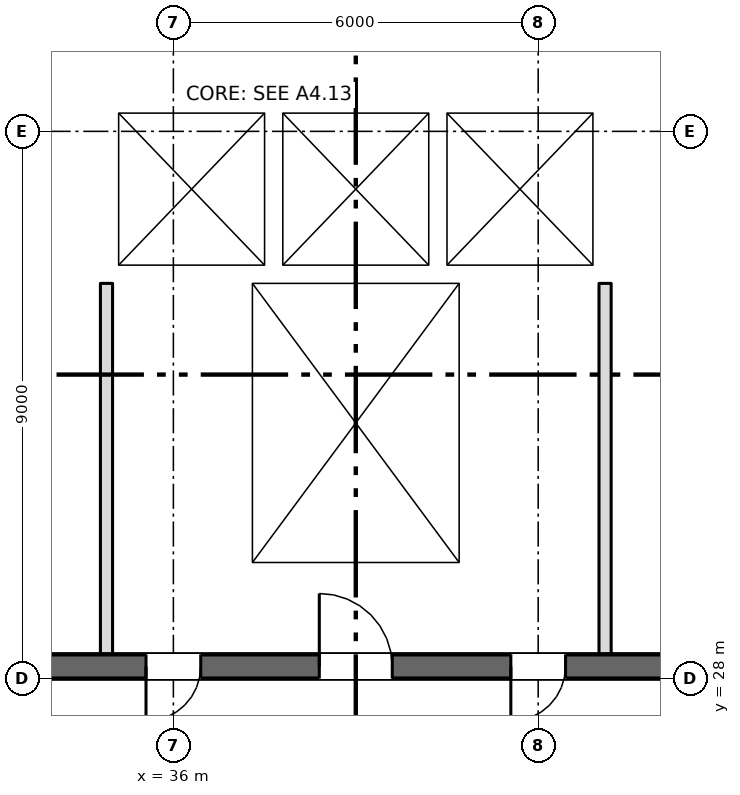
"""IFC4 building model, lengths in metres.
Left out: names, types, materials, properties, quantities, classifications, styles, units other than length and angle.
Written with IfcOpenShell. Run it as: python <this file> out.ifc"""

import sys

from ifc_helpers import new_model, si_unit, direction, frame, frame_2d, origin, place, context, subcontext, project, spatial, rectangle, extrude, element, fill, save


model = new_model("IFC4")
c1 = context("Model", 3, precision=1e-05, world=origin(), true_north=direction((0.0, 1.0)))
c2 = subcontext(c1, "Body", "Model", "MODEL_VIEW")
j1 = project(units=[si_unit("LENGTHUNIT", "METRE"), si_unit("PLANEANGLEUNIT", "RADIAN")], contexts=[c1])
p1 = place(None, origin())
s1 = spatial("IfcSite", under=j1, at=p1, CompositionType="ELEMENT")
p2 = place(p1, origin())
s2 = spatial("IfcBuilding", under=s1, at=p2, CompositionType="ELEMENT")
p3 = place(p2, frame((0.0, 0.0, 86.25)))
s3 = spatial("IfcBuildingStorey", under=s2, at=p3, CompositionType="ELEMENT", Elevation=86.25)
p4 = place(p3, frame((6.7, 28.2, 0.0), z_axis=(0.0, 0.0, 1.0), x_axis=(1.0, 0.0, 0.0)))
e1 = element("IfcWall", 1, at=p4, inside=s3, PredefinedType="SHEAR", context=c2, shape_type="SweptSolid", body=[
    extrude(rectangle(XDim=57.8, YDim=0.4, at=frame_2d((28.9, 0.0))), origin(), (0.0, 0.0, 1.0), 3.15),
])
p5 = place(p4, frame((12.812, 0.0, 0.0)))
e2 = element("IfcOpeningElement", 2, at=p5, cuts=e1, PredefinedType="OPENING", context=c2, shape_type="SweptSolid", body=[
    extrude(rectangle(XDim=0.9, YDim=2.1, at=frame_2d((0.45, 1.05))), frame((0.0, 0.21, 0.0), z_axis=(0.0, -1.0, 0.0), x_axis=(1.0, 0.0, 0.0)), (0.0, 0.0, 1.0), 0.42),
])
p6 = place(p4, frame((15.387, 0.0, 0.0)))
e3 = element("IfcOpeningElement", 3, at=p6, cuts=e1, PredefinedType="OPENING", context=c2, shape_type="SweptSolid", body=[
    extrude(rectangle(XDim=0.9, YDim=2.1, at=frame_2d((0.45, 1.05))), frame((0.0, 0.21, 0.0), z_axis=(0.0, -1.0, 0.0), x_axis=(1.0, 0.0, 0.0)), (0.0, 0.0, 1.0), 0.42),
])
p7 = place(p4, frame((48.312, 0.0, 0.0)))
e4 = element("IfcOpeningElement", 4, at=p7, cuts=e1, PredefinedType="OPENING", context=c2, shape_type="SweptSolid", body=[
    extrude(rectangle(XDim=0.9, YDim=2.1, at=frame_2d((0.45, 1.05))), frame((0.0, 0.21, 0.0), z_axis=(0.0, -1.0, 0.0), x_axis=(1.0, 0.0, 0.0)), (0.0, 0.0, 1.0), 0.42),
])
p8 = place(p4, frame((50.887, 0.0, 0.0)))
e5 = element("IfcOpeningElement", 5, at=p8, cuts=e1, PredefinedType="OPENING", context=c2, shape_type="SweptSolid", body=[
    extrude(rectangle(XDim=0.9, YDim=2.1, at=frame_2d((0.45, 1.05))), frame((0.0, 0.21, 0.0), z_axis=(0.0, -1.0, 0.0), x_axis=(1.0, 0.0, 0.0)), (0.0, 0.0, 1.0), 0.42),
])
p9 = place(p4, frame((0.562, 0.0, 0.0)))
e6 = element("IfcOpeningElement", 6, at=p9, cuts=e1, PredefinedType="OPENING", context=c2, shape_type="SweptSolid", body=[
    extrude(rectangle(XDim=0.9, YDim=2.1, at=frame_2d((0.45, 1.05))), frame((0.0, 0.21, 0.0), z_axis=(0.0, -1.0, 0.0), x_axis=(1.0, 0.0, 0.0)), (0.0, 0.0, 1.0), 0.42),
])
p10 = place(p4, frame((2.137, 0.0, 0.0)))
e7 = element("IfcOpeningElement", 7, at=p10, cuts=e1, PredefinedType="OPENING", context=c2, shape_type="SweptSolid", body=[
    extrude(rectangle(XDim=0.9, YDim=2.1, at=frame_2d((0.45, 1.05))), frame((0.0, 0.21, 0.0), z_axis=(0.0, -1.0, 0.0), x_axis=(1.0, 0.0, 0.0)), (0.0, 0.0, 1.0), 0.42),
])
p11 = place(p4, frame((4.7, 0.0, 0.0)))
e8 = element("IfcOpeningElement", 8, at=p11, cuts=e1, PredefinedType="OPENING", context=c2, shape_type="SweptSolid", body=[
    extrude(rectangle(XDim=1.2, YDim=2.1, at=frame_2d((0.6, 1.05))), frame((0.0, 0.21, 0.0), z_axis=(0.0, -1.0, 0.0), x_axis=(1.0, 0.0, 0.0)), (0.0, 0.0, 1.0), 0.42),
])
p12 = place(p4, frame((31.7, 0.0, 0.0)))
e9 = element("IfcOpeningElement", 9, at=p12, cuts=e1, PredefinedType="OPENING", context=c2, shape_type="SweptSolid", body=[
    extrude(rectangle(XDim=1.2, YDim=2.1, at=frame_2d((0.6, 1.05))), frame((0.0, 0.21, 0.0), z_axis=(0.0, -1.0, 0.0), x_axis=(1.0, 0.0, 0.0)), (0.0, 0.0, 1.0), 0.42),
])
p13 = place(p4, frame((55.2, 0.0, 0.0)))
e10 = element("IfcOpeningElement", 10, at=p13, cuts=e1, PredefinedType="OPENING", context=c2, shape_type="SweptSolid", body=[
    extrude(rectangle(XDim=1.2, YDim=2.1, at=frame_2d((0.6, 1.05))), frame((0.0, 0.21, 0.0), z_axis=(0.0, -1.0, 0.0), x_axis=(1.0, 0.0, 0.0)), (0.0, 0.0, 1.0), 0.42),
])
p14 = place(p4, frame((21.7, 0.0, 0.0)))
e11 = element("IfcOpeningElement", 11, at=p14, cuts=e1, PredefinedType="OPENING", context=c2, shape_type="SweptSolid", body=[
    extrude(rectangle(XDim=1.2, YDim=2.1, at=frame_2d((0.6, 1.05))), frame((0.0, 0.21, 0.0), z_axis=(0.0, -1.0, 0.0), x_axis=(1.0, 0.0, 0.0)), (0.0, 0.0, 1.0), 0.42),
])
p15 = place(p4, frame((41.7, 0.0, 0.0)))
e12 = element("IfcOpeningElement", 12, at=p15, cuts=e1, PredefinedType="OPENING", context=c2, shape_type="SweptSolid", body=[
    extrude(rectangle(XDim=1.2, YDim=2.1, at=frame_2d((0.6, 1.05))), frame((0.0, 0.21, 0.0), z_axis=(0.0, -1.0, 0.0), x_axis=(1.0, 0.0, 0.0)), (0.0, 0.0, 1.0), 0.42),
])
p16 = place(p4, frame((24.85, 0.0, 0.0)))
e13 = element("IfcOpeningElement", 13, at=p16, cuts=e1, PredefinedType="OPENING", context=c2, shape_type="SweptSolid", body=[
    extrude(rectangle(XDim=2.4, YDim=2.1, at=frame_2d((1.2, 1.05))), frame((0.0, 0.21, 0.0), z_axis=(0.0, -1.0, 0.0), x_axis=(1.0, 0.0, 0.0)), (0.0, 0.0, 1.0), 0.42),
])
p17 = place(p4, frame((37.35, 0.0, 0.0)))
e14 = element("IfcOpeningElement", 14, at=p17, cuts=e1, PredefinedType="OPENING", context=c2, shape_type="SweptSolid", body=[
    extrude(rectangle(XDim=2.4, YDim=2.1, at=frame_2d((1.2, 1.05))), frame((0.0, 0.21, 0.0), z_axis=(0.0, -1.0, 0.0), x_axis=(1.0, 0.0, 0.0)), (0.0, 0.0, 1.0), 0.42),
])
p18 = place(p4, frame((7.85, 0.0, 0.0)))
e15 = element("IfcOpeningElement", 15, at=p18, cuts=e1, PredefinedType="OPENING", context=c2, shape_type="SweptSolid", body=[
    extrude(rectangle(XDim=2.4, YDim=2.1, at=frame_2d((1.2, 1.05))), frame((0.0, 0.21, 0.0), z_axis=(0.0, -1.0, 0.0), x_axis=(1.0, 0.0, 0.0)), (0.0, 0.0, 1.0), 0.42),
])
p19 = place(p4, frame((28.85, 0.0, 0.0)))
e16 = element("IfcOpeningElement", 16, at=p19, cuts=e1, PredefinedType="OPENING", context=c2, shape_type="SweptSolid", body=[
    extrude(rectangle(XDim=0.9, YDim=2.1, at=frame_2d((0.45, 1.05))), frame((0.0, 0.21, 0.0), z_axis=(0.0, -1.0, 0.0), x_axis=(1.0, 0.0, 0.0)), (0.0, 0.0, 1.0), 0.42),
])
p20 = place(p4, frame((34.85, 0.0, 0.0)))
e17 = element("IfcOpeningElement", 17, at=p20, cuts=e1, PredefinedType="OPENING", context=c2, shape_type="SweptSolid", body=[
    extrude(rectangle(XDim=0.9, YDim=2.1, at=frame_2d((0.45, 1.05))), frame((0.0, 0.21, 0.0), z_axis=(0.0, -1.0, 0.0), x_axis=(1.0, 0.0, 0.0)), (0.0, 0.0, 1.0), 0.42),
])
for number, where, z_axis, x_axis in (
    (18, (37.15, 28.4, 0.0), (0.0, 0.0, 1.0), (0.0, 1.0, 0.0)),
    (19, (40.85, 28.4, 0.0), (0.0, 0.0, 1.0), (0.0, 1.0, 0.0)),
):
    element("IfcWall", number, at=place(p3, frame(where, z_axis=z_axis, x_axis=x_axis)), inside=s3, PredefinedType="SHEAR", context=c2, shape_type="SweptSolid", body=[
        extrude(rectangle(XDim=6.1, YDim=0.3, at=frame_2d((3.05, 0.0))), origin(), (0.0, 0.0, 1.0), 3.15),
    ])
p21 = place(p3, frame((34.8, 34.65, 0.0), z_axis=(0.0, 0.0, 1.0), x_axis=(1.0, 0.0, 0.0)))
e20 = element("IfcWall", 20, at=p21, inside=s3, PredefinedType="SHEAR", context=c2, shape_type="SweptSolid", body=[
    extrude(rectangle(XDim=8.4, YDim=0.3, at=frame_2d((4.2, 0.0))), origin(), (0.0, 0.0, 1.0), 3.15),
])
p22 = place(p3, frame((34.8, 37.45, 0.0), z_axis=(0.0, 0.0, 1.0), x_axis=(1.0, 0.0, 0.0)))
e21 = element("IfcWall", 21, at=p22, inside=s3, PredefinedType="SHEAR", context=c2, shape_type="SweptSolid", body=[
    extrude(rectangle(XDim=8.4, YDim=0.3, at=frame_2d((4.2, 0.0))), origin(), (0.0, 0.0, 1.0), 3.15),
])
p23 = place(p22, frame((0.95, 0.0, 0.0)))
e22 = element("IfcOpeningElement", 22, at=p23, cuts=e21, PredefinedType="OPENING", context=c2, shape_type="SweptSolid", body=[
    extrude(rectangle(XDim=1.1, YDim=2.1, at=frame_2d((0.55, 1.05))), frame((0.0, 0.16, 0.0), z_axis=(0.0, -1.0, 0.0), x_axis=(1.0, 0.0, 0.0)), (0.0, 0.0, 1.0), 0.32),
])
p24 = place(p22, frame((3.65, 0.0, 0.0)))
e23 = element("IfcOpeningElement", 23, at=p24, cuts=e21, PredefinedType="OPENING", context=c2, shape_type="SweptSolid", body=[
    extrude(rectangle(XDim=1.1, YDim=2.1, at=frame_2d((0.55, 1.05))), frame((0.0, 0.16, 0.0), z_axis=(0.0, -1.0, 0.0), x_axis=(1.0, 0.0, 0.0)), (0.0, 0.0, 1.0), 0.32),
])
p25 = place(p22, frame((6.35, 0.0, 0.0)))
e24 = element("IfcOpeningElement", 24, at=p25, cuts=e21, PredefinedType="OPENING", context=c2, shape_type="SweptSolid", body=[
    extrude(rectangle(XDim=1.1, YDim=2.1, at=frame_2d((0.55, 1.05))), frame((0.0, 0.16, 0.0), z_axis=(0.0, -1.0, 0.0), x_axis=(1.0, 0.0, 0.0)), (0.0, 0.0, 1.0), 0.32),
])
for number, where, z_axis, x_axis in (
    (25, (34.95, 34.8, 0.0), (0.0, 0.0, 1.0), (0.0, 1.0, 0.0)),
    (26, (43.05, 34.8, 0.0), (0.0, 0.0, 1.0), (0.0, 1.0, 0.0)),
    (27, (37.65, 34.8, 0.0), (0.0, 0.0, 1.0), (0.0, 1.0, 0.0)),
    (28, (40.35, 34.8, 0.0), (0.0, 0.0, 1.0), (0.0, 1.0, 0.0)),
):
    element("IfcWall", number, at=place(p3, frame(where, z_axis=z_axis, x_axis=x_axis)), inside=s3, PredefinedType="SHEAR", context=c2, shape_type="SweptSolid", body=[
        extrude(rectangle(XDim=2.5, YDim=0.3, at=frame_2d((1.25, 0.0))), origin(), (0.0, 0.0, 1.0), 3.15),
    ])
for number, where, z_axis, x_axis in (
    (29, (34.9, 28.4, 0.0), (0.0, 0.0, 1.0), (0.0, 1.0, 0.0)),
    (30, (43.1, 28.4, 0.0), (0.0, 0.0, 1.0), (0.0, 1.0, 0.0)),
):
    element("IfcWall", number, at=place(p3, frame(where, z_axis=z_axis, x_axis=x_axis)), inside=s3, PredefinedType="PARTITIONING", context=c2, shape_type="SweptSolid", body=[
        extrude(rectangle(XDim=6.1, YDim=0.2, at=frame_2d((3.05, 0.0))), origin(), (0.0, 0.0, 1.0), 3.15),
    ])
p26 = place(p23, origin())
e31 = element("IfcDoor", 31, at=p26, inside=s3, OperationType="SLIDING_TO_LEFT", PredefinedType="DOOR", context=c2, shape_type="SweptSolid", body=[
    extrude(rectangle(XDim=1.1, YDim=2.1, at=frame_2d((0.55, 1.05))), frame((0.0, 0.025, 0.0), z_axis=(0.0, -1.0, 0.0), x_axis=(1.0, 0.0, 0.0)), (0.0, 0.0, 1.0), 0.05),
])
fill(e22, e31)
p27 = place(p24, origin())
e32 = element("IfcDoor", 32, at=p27, inside=s3, OperationType="SLIDING_TO_LEFT", PredefinedType="DOOR", context=c2, shape_type="SweptSolid", body=[
    extrude(rectangle(XDim=1.1, YDim=2.1, at=frame_2d((0.55, 1.05))), frame((0.0, 0.025, 0.0), z_axis=(0.0, -1.0, 0.0), x_axis=(1.0, 0.0, 0.0)), (0.0, 0.0, 1.0), 0.05),
])
fill(e23, e32)
p28 = place(p25, origin())
e33 = element("IfcDoor", 33, at=p28, inside=s3, OperationType="SLIDING_TO_LEFT", PredefinedType="DOOR", context=c2, shape_type="SweptSolid", body=[
    extrude(rectangle(XDim=1.1, YDim=2.1, at=frame_2d((0.55, 1.05))), frame((0.0, 0.025, 0.0), z_axis=(0.0, -1.0, 0.0), x_axis=(1.0, 0.0, 0.0)), (0.0, 0.0, 1.0), 0.05),
])
fill(e24, e33)
p29 = place(p12, origin())
e34 = element("IfcDoor", 34, at=p29, inside=s3, OperationType="SINGLE_SWING_LEFT", PredefinedType="DOOR", context=c2, shape_type="SweptSolid", body=[
    extrude(rectangle(XDim=1.2, YDim=2.1, at=frame_2d((0.6, 1.05))), frame((0.0, 0.025, 0.0), z_axis=(0.0, -1.0, 0.0), x_axis=(1.0, 0.0, 0.0)), (0.0, 0.0, 1.0), 0.05),
])
fill(e9, e34)
p30 = place(p19, origin())
e35 = element("IfcDoor", 35, at=p30, inside=s3, OperationType="SINGLE_SWING_LEFT", PredefinedType="DOOR", context=c2, shape_type="SweptSolid", body=[
    extrude(rectangle(XDim=0.9, YDim=2.1, at=frame_2d((0.45, 1.05))), frame((0.0, 0.025, 0.0), z_axis=(0.0, -1.0, 0.0), x_axis=(1.0, 0.0, 0.0)), (0.0, 0.0, 1.0), 0.05),
])
fill(e16, e35)
p31 = place(p20, origin())
e36 = element("IfcDoor", 36, at=p31, inside=s3, OperationType="SINGLE_SWING_LEFT", PredefinedType="DOOR", context=c2, shape_type="SweptSolid", body=[
    extrude(rectangle(XDim=0.9, YDim=2.1, at=frame_2d((0.45, 1.05))), frame((0.0, 0.025, 0.0), z_axis=(0.0, -1.0, 0.0), x_axis=(1.0, 0.0, 0.0)), (0.0, 0.0, 1.0), 0.05),
])
fill(e17, e36)
save(model, sys.argv[1])
